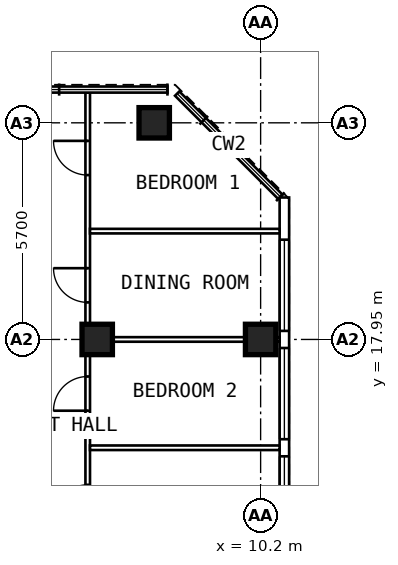
"""IFC4 building model, lengths in metres.
Left out: names, types, materials, properties, quantities, classifications, styles, units other than length and angle.
Written with IfcOpenShell. Run it as: python <this file> out.ifc"""

import sys

from ifc_helpers import new_model, si_unit, direction, frame, frame_2d, origin, origin_2d, place, context, subcontext, project, spatial, rectangle, extrude, element, fill, save


model = new_model("IFC4")
c1 = context("Model", 3, precision=1e-05, world=origin(), true_north=direction((0.0, 1.0)))
c2 = subcontext(c1, "Body", "Model", "MODEL_VIEW")
j1 = project(units=[si_unit("LENGTHUNIT", "METRE"), si_unit("PLANEANGLEUNIT", "RADIAN")], contexts=[c1])
p1 = place(None, origin())
s1 = spatial("IfcSite", under=j1, at=p1, CompositionType="ELEMENT")
p2 = place(p1, origin())
s2 = spatial("IfcBuilding", under=s1, at=p2, CompositionType="ELEMENT")
p3 = place(p2, frame((0.0, 0.0, 281.8)))
s3 = spatial("IfcBuildingStorey", under=s2, at=p3, CompositionType="ELEMENT", Elevation=281.8)
for number, where, z_axis, x_axis in (
    (1, (10.2, 17.95, 0.0), (0.0, 0.0, 1.0), (0.0, 1.0, 0.0)),
    (2, (7.4, 23.65, 0.0), (0.0, 0.0, 1.0), (0.0, 1.0, 0.0)),
    (3, (5.9, 17.95, 0.0), (0.0, 0.0, 1.0), (0.0, 1.0, 0.0)),
):
    element("IfcColumn", number, at=place(p3, frame(where, z_axis=z_axis, x_axis=x_axis)), inside=s3, PredefinedType="COLUMN", context=c2, shape_type="SweptSolid", body=[
        extrude(rectangle(XDim=0.8, YDim=0.8, at=origin_2d()), origin(), (0.0, 0.0, 1.0), 3.6),
    ])
p4 = place(p3, frame((10.825, 6.409, 0.0), z_axis=(0.0, 0.0, 1.0), x_axis=(0.0, 1.0, 0.0)))
e4 = element("IfcWall", 4, at=p4, inside=s3, PredefinedType="SOLIDWALL", context=c2, shape_type="SweptSolid", body=[
    extrude(rectangle(XDim=15.276, YDim=0.25, at=frame_2d((7.638, 0.0))), origin(), (0.0, 0.0, 1.0), 3.35),
])
p5 = place(p4, frame((0.366, 0.0, 0.6)))
e5 = element("IfcOpeningElement", 5, at=p5, cuts=e4, PredefinedType="OPENING", context=c2, shape_type="SweptSolid", body=[
    extrude(rectangle(XDim=2.4, YDim=2.0, at=frame_2d((1.2, 1.0))), frame((0.0, 0.137, 0.0), z_axis=(0.0, -1.0, 0.0), x_axis=(1.0, 0.0, 0.0)), (0.0, 0.0, 1.0), 0.274),
])
p6 = place(p4, frame((3.216, 0.0, 0.6)))
e6 = element("IfcOpeningElement", 6, at=p6, cuts=e4, PredefinedType="OPENING", context=c2, shape_type="SweptSolid", body=[
    extrude(rectangle(XDim=2.4, YDim=2.0, at=frame_2d((1.2, 1.0))), frame((0.0, 0.137, 0.0), z_axis=(0.0, -1.0, 0.0), x_axis=(1.0, 0.0, 0.0)), (0.0, 0.0, 1.0), 0.274),
])
p7 = place(p4, frame((6.066, 0.0, 0.6)))
e7 = element("IfcOpeningElement", 7, at=p7, cuts=e4, PredefinedType="OPENING", context=c2, shape_type="SweptSolid", body=[
    extrude(rectangle(XDim=2.4, YDim=2.0, at=frame_2d((1.2, 1.0))), frame((0.0, 0.137, 0.0), z_axis=(0.0, -1.0, 0.0), x_axis=(1.0, 0.0, 0.0)), (0.0, 0.0, 1.0), 0.274),
])
p8 = place(p4, frame((8.916, 0.0, 0.6)))
e8 = element("IfcOpeningElement", 8, at=p8, cuts=e4, PredefinedType="OPENING", context=c2, shape_type="SweptSolid", body=[
    extrude(rectangle(XDim=2.4, YDim=2.0, at=frame_2d((1.2, 1.0))), frame((0.0, 0.137, 0.0), z_axis=(0.0, -1.0, 0.0), x_axis=(1.0, 0.0, 0.0)), (0.0, 0.0, 1.0), 0.274),
])
p9 = place(p4, frame((11.766, 0.0, 0.6)))
e9 = element("IfcOpeningElement", 9, at=p9, cuts=e4, PredefinedType="OPENING", context=c2, shape_type="SweptSolid", body=[
    extrude(rectangle(XDim=2.4, YDim=2.0, at=frame_2d((1.2, 1.0))), frame((0.0, 0.137, 0.0), z_axis=(0.0, -1.0, 0.0), x_axis=(1.0, 0.0, 0.0)), (0.0, 0.0, 1.0), 0.274),
])
p10 = place(p3, frame((5.65, 9.6, 0.0), z_axis=(0.0, 0.0, 1.0), x_axis=(0.0, 1.0, 0.0)))
e10 = element("IfcWall", 10, at=p10, inside=s3, PredefinedType="PARTITIONING", context=c2, shape_type="SweptSolid", body=[
    extrude(rectangle(XDim=14.845, YDim=0.12, at=frame_2d((7.422, 0.0))), origin(), (0.0, 0.0, 1.0), 3.35),
])
p11 = place(p10, frame((1.075, 0.0, 0.0)))
e11 = element("IfcOpeningElement", 11, at=p11, cuts=e10, PredefinedType="OPENING", context=c2, shape_type="SweptSolid", body=[
    extrude(rectangle(XDim=0.9, YDim=2.1, at=frame_2d((0.45, 1.05))), frame((0.0, 0.072, 0.0), z_axis=(0.0, -1.0, 0.0), x_axis=(1.0, 0.0, 0.0)), (0.0, 0.0, 1.0), 0.144),
])
p12 = place(p10, frame((3.625, 0.0, 0.0)))
e12 = element("IfcOpeningElement", 12, at=p12, cuts=e10, PredefinedType="OPENING", context=c2, shape_type="SweptSolid", body=[
    extrude(rectangle(XDim=0.9, YDim=2.1, at=frame_2d((0.45, 1.05))), frame((0.0, 0.072, 0.0), z_axis=(0.0, -1.0, 0.0), x_axis=(1.0, 0.0, 0.0)), (0.0, 0.0, 1.0), 0.144),
])
p13 = place(p10, frame((6.475, 0.0, 0.0)))
e13 = element("IfcOpeningElement", 13, at=p13, cuts=e10, PredefinedType="OPENING", context=c2, shape_type="SweptSolid", body=[
    extrude(rectangle(XDim=0.9, YDim=2.1, at=frame_2d((0.45, 1.05))), frame((0.0, 0.072, 0.0), z_axis=(0.0, -1.0, 0.0), x_axis=(1.0, 0.0, 0.0)), (0.0, 0.0, 1.0), 0.144),
])
p14 = place(p10, frame((9.325, 0.0, 0.0)))
e14 = element("IfcOpeningElement", 14, at=p14, cuts=e10, PredefinedType="OPENING", context=c2, shape_type="SweptSolid", body=[
    extrude(rectangle(XDim=0.9, YDim=2.1, at=frame_2d((0.45, 1.05))), frame((0.0, 0.072, 0.0), z_axis=(0.0, -1.0, 0.0), x_axis=(1.0, 0.0, 0.0)), (0.0, 0.0, 1.0), 0.144),
])
p15 = place(p10, frame((12.675, 0.0, 0.0)))
e15 = element("IfcOpeningElement", 15, at=p15, cuts=e10, PredefinedType="OPENING", context=c2, shape_type="SweptSolid", body=[
    extrude(rectangle(XDim=0.9, YDim=2.1, at=frame_2d((0.45, 1.05))), frame((0.0, 0.072, 0.0), z_axis=(0.0, -1.0, 0.0), x_axis=(1.0, 0.0, 0.0)), (0.0, 0.0, 1.0), 0.144),
])
p16 = place(p3, frame((5.71, 15.1, 0.0), z_axis=(0.0, 0.0, 1.0), x_axis=(1.0, 0.0, 0.0)))
e16 = element("IfcWall", 16, at=p16, inside=s3, PredefinedType="PARTITIONING", context=c2, shape_type="SweptSolid", body=[
    extrude(rectangle(XDim=4.99, YDim=0.12, at=frame_2d((2.495, 0.0))), origin(), (0.0, 0.0, 1.0), 3.35),
])
p17 = place(p3, frame((5.71, 17.95, 0.0), z_axis=(0.0, 0.0, 1.0), x_axis=(1.0, 0.0, 0.0)))
e17 = element("IfcWall", 17, at=p17, inside=s3, PredefinedType="PARTITIONING", context=c2, shape_type="SweptSolid", body=[
    extrude(rectangle(XDim=4.99, YDim=0.12, at=frame_2d((2.495, 0.0))), origin(), (0.0, 0.0, 1.0), 2.45),
])
p18 = place(p3, frame((5.71, 20.8, 0.0), z_axis=(0.0, 0.0, 1.0), x_axis=(1.0, 0.0, 0.0)))
e18 = element("IfcWall", 18, at=p18, inside=s3, PredefinedType="PARTITIONING", context=c2, shape_type="SweptSolid", body=[
    extrude(rectangle(XDim=4.99, YDim=0.12, at=frame_2d((2.495, 0.0))), origin(), (0.0, 0.0, 1.0), 3.35),
])
p19 = place(p7, origin())
e19 = element("IfcWindow", 19, at=p19, inside=s3, PartitioningType="SINGLE_PANEL", PredefinedType="WINDOW", context=c2, shape_type="SweptSolid", body=[
    extrude(rectangle(XDim=2.4, YDim=2.0, at=frame_2d((1.2, 1.0))), frame((0.0, 0.03, 0.0), z_axis=(0.0, -1.0, 0.0), x_axis=(1.0, 0.0, 0.0)), (0.0, 0.0, 1.0), 0.06),
])
fill(e7, e19)
p20 = place(p8, origin())
e20 = element("IfcWindow", 20, at=p20, inside=s3, PartitioningType="SINGLE_PANEL", PredefinedType="WINDOW", context=c2, shape_type="SweptSolid", body=[
    extrude(rectangle(XDim=2.4, YDim=2.0, at=frame_2d((1.2, 1.0))), frame((0.0, 0.03, 0.0), z_axis=(0.0, -1.0, 0.0), x_axis=(1.0, 0.0, 0.0)), (0.0, 0.0, 1.0), 0.06),
])
fill(e8, e20)
p21 = place(p9, origin())
e21 = element("IfcWindow", 21, at=p21, inside=s3, PartitioningType="SINGLE_PANEL", PredefinedType="WINDOW", context=c2, shape_type="SweptSolid", body=[
    extrude(rectangle(XDim=2.4, YDim=2.0, at=frame_2d((1.2, 1.0))), frame((0.0, 0.03, 0.0), z_axis=(0.0, -1.0, 0.0), x_axis=(1.0, 0.0, 0.0)), (0.0, 0.0, 1.0), 0.06),
])
fill(e9, e21)
p22 = place(p12, origin())
e22 = element("IfcDoor", 22, at=p22, inside=s3, OperationType="SINGLE_SWING_LEFT", PredefinedType="DOOR", context=c2, shape_type="SweptSolid", body=[
    extrude(rectangle(XDim=0.9, YDim=2.1, at=frame_2d((0.45, 1.05))), frame((0.0, 0.025, 0.0), z_axis=(0.0, -1.0, 0.0), x_axis=(1.0, 0.0, 0.0)), (0.0, 0.0, 1.0), 0.05),
])
fill(e12, e22)
p23 = place(p13, origin())
e23 = element("IfcDoor", 23, at=p23, inside=s3, OperationType="SINGLE_SWING_LEFT", PredefinedType="DOOR", context=c2, shape_type="SweptSolid", body=[
    extrude(rectangle(XDim=0.9, YDim=2.1, at=frame_2d((0.45, 1.05))), frame((0.0, 0.025, 0.0), z_axis=(0.0, -1.0, 0.0), x_axis=(1.0, 0.0, 0.0)), (0.0, 0.0, 1.0), 0.05),
])
fill(e13, e23)
p24 = place(p14, origin())
e24 = element("IfcDoor", 24, at=p24, inside=s3, OperationType="SINGLE_SWING_RIGHT", PredefinedType="DOOR", context=c2, shape_type="SweptSolid", body=[
    extrude(rectangle(XDim=0.9, YDim=2.1, at=frame_2d((0.45, 1.05))), frame((0.0, 0.025, 0.0), z_axis=(0.0, -1.0, 0.0), x_axis=(1.0, 0.0, 0.0)), (0.0, 0.0, 1.0), 0.05),
])
fill(e14, e24)
p25 = place(p15, origin())
e25 = element("IfcDoor", 25, at=p25, inside=s3, OperationType="SINGLE_SWING_RIGHT", PredefinedType="DOOR", context=c2, shape_type="SweptSolid", body=[
    extrude(rectangle(XDim=0.9, YDim=2.1, at=frame_2d((0.45, 1.05))), frame((0.0, 0.025, 0.0), z_axis=(0.0, -1.0, 0.0), x_axis=(1.0, 0.0, 0.0)), (0.0, 0.0, 1.0), 0.05),
])
fill(e15, e25)
save(model, sys.argv[1])
